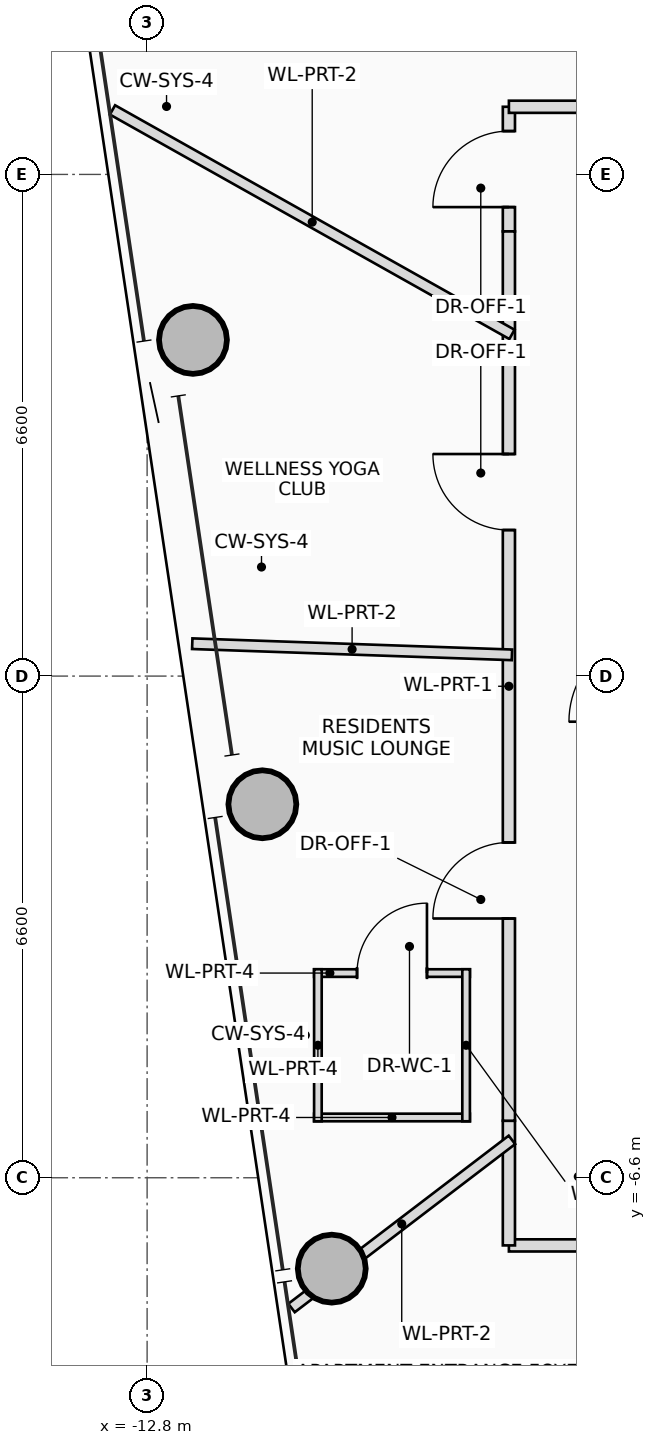
"""IFC4 building model, lengths in metres.
Left out: names, types, materials, properties, quantities, classifications, styles, units other than length and angle.
Written with IfcOpenShell. Run it as: python <this file> out.ifc"""

import sys

from ifc_helpers import new_model, si_unit, direction, frame, frame_2d, origin, origin_2d, place, context, subcontext, project, spatial, rectangle, hollow_circle, extrude, source, transform, mapped, element, fill, save


model = new_model("IFC4")
c1 = context("Model", 3, precision=1e-05, world=origin(), true_north=direction((0.0, 1.0)))
c2 = subcontext(c1, "Body", "Model", "MODEL_VIEW")
j1 = project(units=[si_unit("LENGTHUNIT", "METRE"), si_unit("PLANEANGLEUNIT", "RADIAN")], contexts=[c1])
p1 = place(None, origin())
s1 = spatial("IfcSite", under=j1, at=p1, CompositionType="ELEMENT")
p2 = place(p1, origin())
s2 = spatial("IfcBuilding", under=s1, at=p2, CompositionType="ELEMENT")
p3 = place(p2, frame((0.0, 0.0, 257.55)))
s3 = spatial("IfcBuildingStorey", under=s2, at=p3, CompositionType="ELEMENT", Elevation=257.55)
m1 = source(origin(), c2, "Body", "SweptSolid", [
    extrude(hollow_circle(Radius=0.45, WallThickness=0.032, at=origin_2d()), origin(), (0.0, 0.0, 1.0), 3.4),
])
for number, where, z_axis, x_axis in (
    (1, (-12.197, 4.423, 0.0), (0.0, 0.0, 1.0), (1.0, 0.0, 0.0)),
    (2, (-11.284, -1.686, 0.0), (0.0, 0.0, 1.0), (1.0, 0.0, 0.0)),
    (3, (-10.371, -7.796, 0.0), (0.0, 0.0, 1.0), (1.0, 0.0, 0.0)),
):
    element("IfcColumn", number, at=place(p3, frame(where, z_axis=z_axis, x_axis=x_axis)), inside=s3, PredefinedType="COLUMN", context=c2, shape_type="MappedRepresentation", body=[
        mapped(m1, transform((0.0, 0.0, 0.0), scale=1.0)),
    ])
p4 = place(p3, frame((-10.603, -3.907, 0.0), z_axis=(0.0, 0.0, 1.0), x_axis=(1.0, 0.0, 0.0)))
e4 = element("IfcWall", 4, at=p4, inside=s3, PredefinedType="PARTITIONING", context=c2, shape_type="SweptSolid", body=[
    extrude(rectangle(XDim=2.05, YDim=0.1, at=frame_2d((1.025, 0.0))), origin(), (0.0, 0.0, 1.0), 2.805),
])
p5 = place(p4, frame((0.565, 0.0, 0.0)))
e5 = element("IfcOpeningElement", 5, at=p5, cuts=e4, PredefinedType="OPENING", context=c2, shape_type="SweptSolid", body=[
    extrude(rectangle(XDim=0.92, YDim=2.1, at=frame_2d((0.46, 1.05))), frame((0.0, 0.06, 0.0), z_axis=(0.0, -1.0, 0.0), x_axis=(1.0, 0.0, 0.0)), (0.0, 0.0, 1.0), 0.12),
])
p6 = place(p3, frame((-8.553, -5.807, 0.0), z_axis=(0.0, 0.0, 1.0), x_axis=(-1.0, 0.0, 0.0)))
e6 = element("IfcWall", 6, at=p6, inside=s3, PredefinedType="PARTITIONING", context=c2, shape_type="SweptSolid", body=[
    extrude(rectangle(XDim=2.05, YDim=0.1, at=frame_2d((1.025, 0.0))), origin(), (0.0, 0.0, 1.0), 2.765),
])
p7 = place(p3, frame((-8.603, -3.857, 0.0), z_axis=(0.0, 0.0, 1.0), x_axis=(0.0, -1.0, 0.0)))
e7 = element("IfcWall", 7, at=p7, inside=s3, PredefinedType="PARTITIONING", context=c2, shape_type="SweptSolid", body=[
    extrude(rectangle(XDim=2.0, YDim=0.1, at=frame_2d((1.0, 0.0))), origin(), (0.0, 0.0, 1.0), 2.805),
])
p8 = place(p3, frame((-10.553, -5.857, 0.0), z_axis=(0.0, 0.0, 1.0), x_axis=(0.0, 1.0, 0.0)))
e8 = element("IfcWall", 8, at=p8, inside=s3, PredefinedType="PARTITIONING", context=c2, shape_type="SweptSolid", body=[
    extrude(rectangle(XDim=2.0, YDim=0.1, at=frame_2d((1.0, 0.0))), origin(), (0.0, 0.0, 1.0), 2.765),
])
p9 = place(p3, frame((-8.04, 5.85, 0.0), z_axis=(0.0, 0.0, 1.0), x_axis=(0.0, 1.0, 0.0)))
e9 = element("IfcWall", 9, at=p9, inside=s3, PredefinedType="PARTITIONING", context=c2, shape_type="SweptSolid", body=[
    extrude(rectangle(XDim=1.64, YDim=0.16, at=frame_2d((0.82, 0.0))), origin(), (0.0, 0.0, 1.0), 2.605),
])
p10 = place(p9, frame((0.32, 0.0, 0.0)))
e10 = element("IfcOpeningElement", 10, at=p10, cuts=e9, PredefinedType="OPENING", context=c2, shape_type="SweptSolid", body=[
    extrude(rectangle(XDim=1.0, YDim=2.25, at=frame_2d((0.5, 1.125))), frame((0.0, 0.09, 0.0), z_axis=(0.0, -1.0, 0.0), x_axis=(1.0, 0.0, 0.0)), (0.0, 0.0, 1.0), 0.18),
])
for number, where, z_axis, x_axis in (
    (11, (-8.04, 7.49, 0.0), (0.0, 0.0, 1.0), (1.0, 0.0, 0.0)),
    (12, (-6.36, -7.49, 0.0), (0.0, 0.0, 1.0), (-1.0, 0.0, 0.0)),
):
    element("IfcWall", number, at=place(p3, frame(where, z_axis=z_axis, x_axis=x_axis)), inside=s3, PredefinedType="PARTITIONING", context=c2, shape_type="SweptSolid", body=[
        extrude(rectangle(XDim=1.68, YDim=0.16, at=frame_2d((0.84, 0.0))), origin(), (0.0, 0.0, 1.0), 2.605),
    ])
p11 = place(p3, frame((-8.04, -7.49, 0.0), z_axis=(0.0, 0.0, 1.0), x_axis=(0.0, 1.0, 0.0)))
e13 = element("IfcWall", 13, at=p11, inside=s3, PredefinedType="PARTITIONING", context=c2, shape_type="SweptSolid", body=[
    extrude(rectangle(XDim=1.64, YDim=0.16, at=frame_2d((0.82, 0.0))), origin(), (0.0, 0.0, 1.0), 2.605),
])
p12 = place(p3, frame((-8.04, -5.85, 0.0), z_axis=(0.0, 0.0, 1.0), x_axis=(0.0, 1.0, 0.0)))
e14 = element("IfcWall", 14, at=p12, inside=s3, PredefinedType="PARTITIONING", context=c2, shape_type="SweptSolid", body=[
    extrude(rectangle(XDim=11.7, YDim=0.16, at=frame_2d((5.85, 0.0))), origin(), (0.0, 0.0, 1.0), 2.605),
])
p13 = place(p12, frame((2.661, 0.0, 0.0)))
e15 = element("IfcOpeningElement", 15, at=p13, cuts=e14, PredefinedType="OPENING", context=c2, shape_type="SweptSolid", body=[
    extrude(rectangle(XDim=1.0, YDim=2.25, at=frame_2d((0.5, 1.125))), frame((0.0, 0.09, 0.0), z_axis=(0.0, -1.0, 0.0), x_axis=(1.0, 0.0, 0.0)), (0.0, 0.0, 1.0), 0.18),
])
p14 = place(p12, frame((7.771, 0.0, 0.0)))
e16 = element("IfcOpeningElement", 16, at=p14, cuts=e14, PredefinedType="OPENING", context=c2, shape_type="SweptSolid", body=[
    extrude(rectangle(XDim=1.0, YDim=2.25, at=frame_2d((0.5, 1.125))), frame((0.0, 0.09, 0.0), z_axis=(0.0, -1.0, 0.0), x_axis=(1.0, 0.0, 0.0)), (0.0, 0.0, 1.0), 0.18),
])
p15 = place(p3, frame((-8.0, 4.496, 0.0), z_axis=(0.0, 0.0, 1.0), x_axis=(-0.871799326596, 0.489863179008, 0.0)))
e17 = element("IfcWall", 17, at=p15, inside=s3, PredefinedType="PARTITIONING", context=c2, shape_type="SweptSolid", body=[
    extrude(rectangle(XDim=6.029, YDim=0.14, at=frame_2d((3.014, 0.0))), origin(), (0.0, 0.0, 1.0), 2.605),
])
p16 = place(p3, frame((-8.0, 0.279, 0.0), z_axis=(0.0, 0.0, 1.0), x_axis=(-0.999390047844, 0.034921802229, 0.0)))
e18 = element("IfcWall", 18, at=p16, inside=s3, PredefinedType="PARTITIONING", context=c2, shape_type="SweptSolid", body=[
    extrude(rectangle(XDim=4.209, YDim=0.14, at=frame_2d((2.104, 0.0))), origin(), (0.0, 0.0, 1.0), 2.765),
])
p17 = place(p3, frame((-8.0, -6.102, 0.0), z_axis=(0.0, 0.0, 1.0), x_axis=(-0.795138118829, -0.606428373335, 0.0)))
e19 = element("IfcWall", 19, at=p17, inside=s3, PredefinedType="PARTITIONING", context=c2, shape_type="SweptSolid", body=[
    extrude(rectangle(XDim=3.647, YDim=0.14, at=frame_2d((1.823, 0.0))), origin(), (0.0, 0.0, 1.0), 2.605),
])
p18 = place(p5, origin())
e20 = element("IfcDoor", 20, at=p18, inside=s3, OperationType="SINGLE_SWING_RIGHT", PredefinedType="DOOR", context=c2, shape_type="SweptSolid", body=[
    extrude(rectangle(XDim=0.92, YDim=2.1, at=frame_2d((0.46, 1.05))), frame((0.0, 0.025, 0.0), z_axis=(0.0, -1.0, 0.0), x_axis=(1.0, 0.0, 0.0)), (0.0, 0.0, 1.0), 0.05),
])
fill(e5, e20)
p19 = place(p10, origin())
e21 = element("IfcDoor", 21, at=p19, inside=s3, OperationType="SINGLE_SWING_LEFT", PredefinedType="DOOR", context=c2, shape_type="SweptSolid", body=[
    extrude(rectangle(XDim=1.0, YDim=2.25, at=frame_2d((0.5, 1.125))), frame((0.0, 0.025, 0.0), z_axis=(0.0, -1.0, 0.0), x_axis=(1.0, 0.0, 0.0)), (0.0, 0.0, 1.0), 0.05),
])
fill(e10, e21)
p20 = place(p13, origin())
e22 = element("IfcDoor", 22, at=p20, inside=s3, OperationType="SINGLE_SWING_LEFT", PredefinedType="DOOR", context=c2, shape_type="SweptSolid", body=[
    extrude(rectangle(XDim=1.0, YDim=2.25, at=frame_2d((0.5, 1.125))), frame((0.0, 0.025, 0.0), z_axis=(0.0, -1.0, 0.0), x_axis=(1.0, 0.0, 0.0)), (0.0, 0.0, 1.0), 0.05),
])
fill(e15, e22)
p21 = place(p14, origin())
e23 = element("IfcDoor", 23, at=p21, inside=s3, OperationType="SINGLE_SWING_RIGHT", PredefinedType="DOOR", context=c2, shape_type="SweptSolid", body=[
    extrude(rectangle(XDim=1.0, YDim=2.25, at=frame_2d((0.5, 1.125))), frame((0.0, 0.025, 0.0), z_axis=(0.0, -1.0, 0.0), x_axis=(1.0, 0.0, 0.0)), (0.0, 0.0, 1.0), 0.05),
])
fill(e16, e23)
save(model, sys.argv[1])
